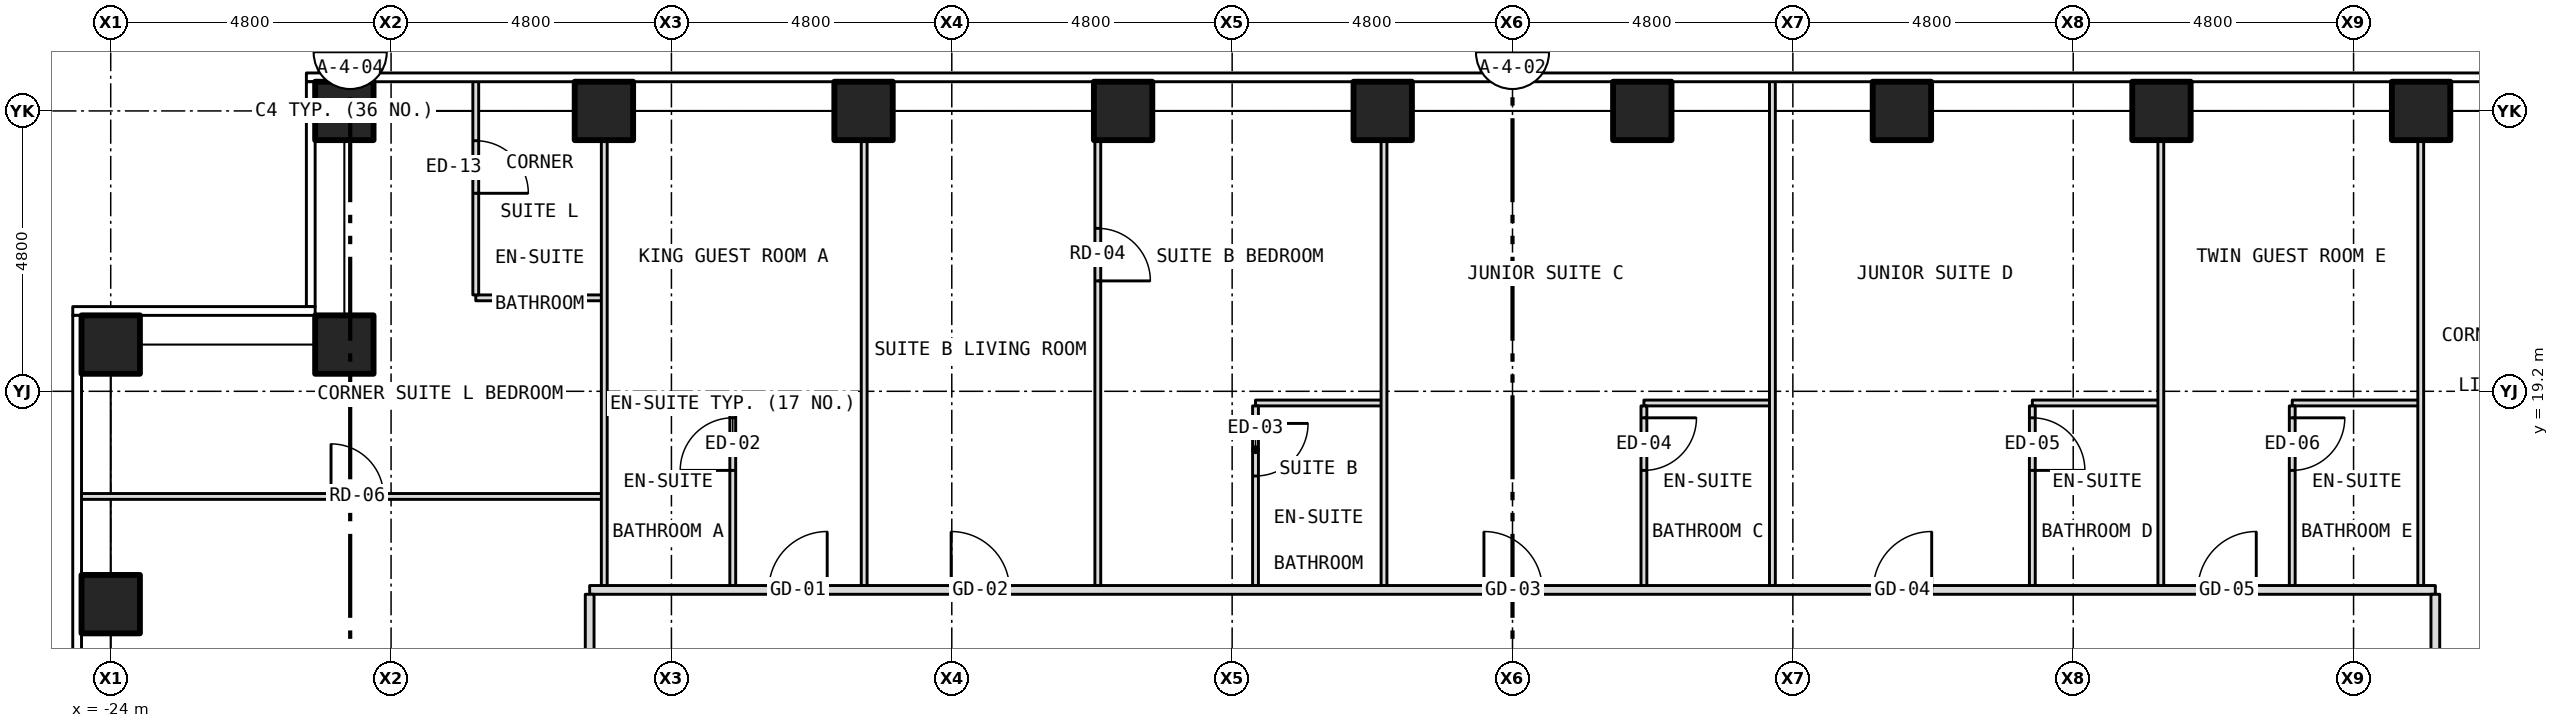
"""IFC4 building model, lengths in metres.
Left out: names, types, materials, properties, quantities, classifications, styles, units other than length and angle.
Written with IfcOpenShell. Run it as: python <this file> out.ifc"""

import sys

from ifc_helpers import new_model, si_unit, direction, frame, frame_2d, origin, origin_2d, place, context, subcontext, project, spatial, rectangle, hollow_rectangle, extrude, element, fill, save


model = new_model("IFC4")
c1 = context("Model", 3, precision=1e-05, world=origin(), true_north=direction((0.0, 1.0)))
c2 = subcontext(c1, "Body", "Model", "MODEL_VIEW")
j1 = project(units=[si_unit("LENGTHUNIT", "METRE"), si_unit("PLANEANGLEUNIT", "RADIAN")], contexts=[c1])
p1 = place(None, origin())
s1 = spatial("IfcSite", under=j1, at=p1, CompositionType="ELEMENT")
p2 = place(p1, origin())
s2 = spatial("IfcBuilding", under=s1, at=p2, CompositionType="ELEMENT")
p3 = place(p2, frame((0.0, 0.0, 46.0)))
s3 = spatial("IfcBuildingStorey", under=s2, at=p3, CompositionType="ELEMENT", Elevation=46.0)
for number, where, z_axis, x_axis in (
    (1, (-20.0, 24.0, -0.15), (0.0, 0.0, 1.0), (1.0, 0.0, 0.0)),
    (2, (-15.556, 24.0, -0.15), (0.0, 0.0, 1.0), (1.0, 0.0, 0.0)),
    (3, (-11.111, 24.0, -0.15), (0.0, 0.0, 1.0), (1.0, 0.0, 0.0)),
    (4, (-6.667, 24.0, -0.15), (0.0, 0.0, 1.0), (1.0, 0.0, 0.0)),
    (5, (-2.222, 24.0, -0.15), (0.0, 0.0, 1.0), (1.0, 0.0, 0.0)),
    (6, (2.222, 24.0, -0.15), (0.0, 0.0, 1.0), (1.0, 0.0, 0.0)),
    (7, (6.667, 24.0, -0.15), (0.0, 0.0, 1.0), (1.0, 0.0, 0.0)),
    (8, (11.111, 24.0, -0.15), (0.0, 0.0, 1.0), (1.0, 0.0, 0.0)),
    (9, (15.556, 24.0, -0.15), (0.0, 0.0, 1.0), (1.0, 0.0, 0.0)),
    (10, (-24.0, 15.556, -0.15), (0.0, 0.0, 1.0), (1.0, 0.0, 0.0)),
    (11, (-24.0, 20.0, -0.15), (0.0, 0.0, 1.0), (1.0, 0.0, 0.0)),
    (12, (-20.0, 20.0, -0.15), (0.0, 0.0, 1.0), (1.0, 0.0, 0.0)),
):
    element("IfcColumn", number, at=place(p3, frame(where, z_axis=z_axis, x_axis=x_axis)), inside=s3, PredefinedType="COLUMN", context=c2, shape_type="SweptSolid", body=[
        extrude(hollow_rectangle(XDim=1.0, YDim=1.0, WallThickness=0.06, at=origin_2d()), origin(), (0.0, 0.0, 1.0), 3.5),
    ])
p4 = place(p3, frame((-15.8, 15.8, 0.0), z_axis=(0.0, 0.0, 1.0), x_axis=(1.0, 0.0, 0.0)))
e13 = element("IfcWall", 13, at=p4, inside=s3, PredefinedType="PARTITIONING", context=c2, shape_type="SweptSolid", body=[
    extrude(rectangle(XDim=31.6, YDim=0.15, at=frame_2d((15.8, 0.0))), origin(), (0.0, 0.0, 1.0), 3.35),
])
p5 = place(p4, frame((3.067, 0.0, 0.0)))
e14 = element("IfcOpeningElement", 14, at=p5, cuts=e13, PredefinedType="OPENING", context=c2, shape_type="SweptSolid", body=[
    extrude(rectangle(XDim=1.0, YDim=2.1, at=frame_2d((0.5, 1.05))), frame((0.0, 0.087, 0.0), z_axis=(0.0, -1.0, 0.0), x_axis=(1.0, 0.0, 0.0)), (0.0, 0.0, 1.0), 0.174),
])
p6 = place(p4, frame((6.189, 0.0, 0.0)))
e15 = element("IfcOpeningElement", 15, at=p6, cuts=e13, PredefinedType="OPENING", context=c2, shape_type="SweptSolid", body=[
    extrude(rectangle(XDim=1.0, YDim=2.1, at=frame_2d((0.5, 1.05))), frame((0.0, 0.087, 0.0), z_axis=(0.0, -1.0, 0.0), x_axis=(1.0, 0.0, 0.0)), (0.0, 0.0, 1.0), 0.174),
])
p7 = place(p4, frame((15.311, 0.0, 0.0)))
e16 = element("IfcOpeningElement", 16, at=p7, cuts=e13, PredefinedType="OPENING", context=c2, shape_type="SweptSolid", body=[
    extrude(rectangle(XDim=1.0, YDim=2.1, at=frame_2d((0.5, 1.05))), frame((0.0, 0.087, 0.0), z_axis=(0.0, -1.0, 0.0), x_axis=(1.0, 0.0, 0.0)), (0.0, 0.0, 1.0), 0.174),
])
p8 = place(p4, frame((21.977, 0.0, 0.0)))
e17 = element("IfcOpeningElement", 17, at=p8, cuts=e13, PredefinedType="OPENING", context=c2, shape_type="SweptSolid", body=[
    extrude(rectangle(XDim=1.0, YDim=2.1, at=frame_2d((0.5, 1.05))), frame((0.0, 0.087, 0.0), z_axis=(0.0, -1.0, 0.0), x_axis=(1.0, 0.0, 0.0)), (0.0, 0.0, 1.0), 0.174),
])
p9 = place(p4, frame((27.534, 0.0, 0.0)))
e18 = element("IfcOpeningElement", 18, at=p9, cuts=e13, PredefinedType="OPENING", context=c2, shape_type="SweptSolid", body=[
    extrude(rectangle(XDim=1.0, YDim=2.1, at=frame_2d((0.5, 1.05))), frame((0.0, 0.087, 0.0), z_axis=(0.0, -1.0, 0.0), x_axis=(1.0, 0.0, 0.0)), (0.0, 0.0, 1.0), 0.174),
])
p10 = place(p3, frame((-24.53, 17.4, 0.0), z_axis=(0.0, 0.0, 1.0), x_axis=(1.0, 0.0, 0.0)))
e19 = element("IfcWall", 19, at=p10, inside=s3, PredefinedType="PARTITIONING", context=c2, shape_type="SweptSolid", body=[
    extrude(rectangle(XDim=8.98, YDim=0.1, at=frame_2d((4.49, 0.0))), origin(), (0.0, 0.0, 1.0), 3.35),
])
p11 = place(p10, frame((4.302, 0.0, 0.0)))
e20 = element("IfcOpeningElement", 20, at=p11, cuts=e19, PredefinedType="OPENING", context=c2, shape_type="SweptSolid", body=[
    extrude(rectangle(XDim=0.9, YDim=2.1, at=frame_2d((0.45, 1.05))), frame((0.0, 0.062, 0.0), z_axis=(0.0, -1.0, 0.0), x_axis=(1.0, 0.0, 0.0)), (0.0, 0.0, 1.0), 0.124),
])
for number, where, z_axis, x_axis in (
    (21, (-15.55, 19.0, 0.0), (0.0, 0.0, 1.0), (1.0, 0.0, 0.0)),
    (22, (-4.4, 19.0, 0.0), (0.0, 0.0, 1.0), (1.0, 0.0, 0.0)),
    (23, (2.25, 19.0, 0.0), (0.0, 0.0, 1.0), (1.0, 0.0, 0.0)),
):
    element("IfcWall", number, at=place(p3, frame(where, z_axis=z_axis, x_axis=x_axis)), inside=s3, PredefinedType="PARTITIONING", context=c2, shape_type="SweptSolid", body=[
        extrude(rectangle(XDim=2.2, YDim=0.1, at=frame_2d((1.1, 0.0))), origin(), (0.0, 0.0, 1.0), 3.35),
    ])
p12 = place(p3, frame((8.9, 19.0, 0.0), z_axis=(0.0, 0.0, 1.0), x_axis=(1.0, 0.0, 0.0)))
e24 = element("IfcWall", 24, at=p12, inside=s3, PredefinedType="PARTITIONING", context=c2, shape_type="SweptSolid", body=[
    extrude(rectangle(XDim=2.2, YDim=0.1, at=frame_2d((1.1, 0.0))), origin(), (0.0, 0.0, 1.0), 3.35),
])
for number, where, z_axis, x_axis in (
    (25, (13.35, 19.0, 0.0), (0.0, 0.0, 1.0), (1.0, 0.0, 0.0)),
    (26, (-17.75, 20.8, 0.0), (0.0, 0.0, 1.0), (1.0, 0.0, 0.0)),
):
    element("IfcWall", number, at=place(p3, frame(where, z_axis=z_axis, x_axis=x_axis)), inside=s3, PredefinedType="PARTITIONING", context=c2, shape_type="SweptSolid", body=[
        extrude(rectangle(XDim=2.2, YDim=0.1, at=frame_2d((1.1, 0.0))), origin(), (0.0, 0.0, 1.0), 3.35),
    ])
p13 = place(p3, frame((-17.75, 20.85, 0.0), z_axis=(0.0, 0.0, 1.0), x_axis=(0.0, 1.0, 0.0)))
e27 = element("IfcWall", 27, at=p13, inside=s3, PredefinedType="PARTITIONING", context=c2, shape_type="SweptSolid", body=[
    extrude(rectangle(XDim=3.68, YDim=0.1, at=frame_2d((1.84, 0.0))), origin(), (0.0, 0.0, 1.0), 3.35),
])
p14 = place(p13, frame((1.74, 0.0, 0.0)))
e28 = element("IfcOpeningElement", 28, at=p14, cuts=e27, PredefinedType="OPENING", context=c2, shape_type="SweptSolid", body=[
    extrude(rectangle(XDim=0.9, YDim=2.1, at=frame_2d((0.45, 1.05))), frame((0.0, 0.062, 0.0), z_axis=(0.0, -1.0, 0.0), x_axis=(1.0, 0.0, 0.0)), (0.0, 0.0, 1.0), 0.124),
])
p15 = place(p3, frame((-15.8, 10.92, 0.0), z_axis=(0.0, 0.0, 1.0), x_axis=(0.0, 1.0, 0.0)))
e29 = element("IfcWall", 29, at=p15, inside=s3, PredefinedType="PARTITIONING", context=c2, shape_type="SweptSolid", body=[
    extrude(rectangle(XDim=4.805, YDim=0.15, at=frame_2d((2.403, 0.0))), origin(), (0.0, 0.0, 1.0), 3.35),
])
p16 = place(p15, frame((0.78, 0.0, 0.0)))
e30 = element("IfcOpeningElement", 30, at=p16, cuts=e29, PredefinedType="OPENING", context=c2, shape_type="SweptSolid", body=[
    extrude(rectangle(XDim=1.0, YDim=2.1, at=frame_2d((0.5, 1.05))), frame((0.0, 0.087, 0.0), z_axis=(0.0, -1.0, 0.0), x_axis=(1.0, 0.0, 0.0)), (0.0, 0.0, 1.0), 0.174),
])
p17 = place(p3, frame((-15.55, 15.875, 0.0), z_axis=(0.0, 0.0, 1.0), x_axis=(0.0, 1.0, 0.0)))
e31 = element("IfcWall", 31, at=p17, inside=s3, PredefinedType="PARTITIONING", context=c2, shape_type="SweptSolid", body=[
    extrude(rectangle(XDim=8.005, YDim=0.1, at=frame_2d((4.002, 0.0))), origin(), (0.0, 0.0, 1.0), 3.35),
])
p18 = place(p3, frame((-13.35, 15.875, 0.0), z_axis=(0.0, 0.0, 1.0), x_axis=(0.0, 1.0, 0.0)))
e32 = element("IfcWall", 32, at=p18, inside=s3, PredefinedType="PARTITIONING", context=c2, shape_type="SweptSolid", body=[
    extrude(rectangle(XDim=3.075, YDim=0.1, at=frame_2d((1.538, 0.0))), origin(), (0.0, 0.0, 1.0), 3.35),
])
p19 = place(p18, frame((1.971, 0.0, 0.0)))
e33 = element("IfcOpeningElement", 33, at=p19, cuts=e32, PredefinedType="OPENING", context=c2, shape_type="SweptSolid", body=[
    extrude(rectangle(XDim=0.9, YDim=2.1, at=frame_2d((0.45, 1.05))), frame((0.0, 0.062, 0.0), z_axis=(0.0, -1.0, 0.0), x_axis=(1.0, 0.0, 0.0)), (0.0, 0.0, 1.0), 0.124),
])
p20 = place(p3, frame((-11.1, 15.875, 0.0), z_axis=(0.0, 0.0, 1.0), x_axis=(0.0, 1.0, 0.0)))
e34 = element("IfcWall", 34, at=p20, inside=s3, PredefinedType="PARTITIONING", context=c2, shape_type="SweptSolid", body=[
    extrude(rectangle(XDim=8.005, YDim=0.1, at=frame_2d((4.002, 0.0))), origin(), (0.0, 0.0, 1.0), 3.35),
])
p21 = place(p3, frame((-7.1, 15.875, 0.0), z_axis=(0.0, 0.0, 1.0), x_axis=(0.0, 1.0, 0.0)))
e35 = element("IfcWall", 35, at=p21, inside=s3, PredefinedType="PARTITIONING", context=c2, shape_type="SweptSolid", body=[
    extrude(rectangle(XDim=8.005, YDim=0.1, at=frame_2d((4.002, 0.0))), origin(), (0.0, 0.0, 1.0), 3.35),
])
p22 = place(p21, frame((5.215, 0.0, 0.0)))
e36 = element("IfcOpeningElement", 36, at=p22, cuts=e35, PredefinedType="OPENING", context=c2, shape_type="SweptSolid", body=[
    extrude(rectangle(XDim=0.9, YDim=2.1, at=frame_2d((0.45, 1.05))), frame((0.0, 0.062, 0.0), z_axis=(0.0, -1.0, 0.0), x_axis=(1.0, 0.0, 0.0)), (0.0, 0.0, 1.0), 0.124),
])
p23 = place(p3, frame((-4.4, 15.875, 0.0), z_axis=(0.0, 0.0, 1.0), x_axis=(0.0, 1.0, 0.0)))
e37 = element("IfcWall", 37, at=p23, inside=s3, PredefinedType="PARTITIONING", context=c2, shape_type="SweptSolid", body=[
    extrude(rectangle(XDim=3.075, YDim=0.1, at=frame_2d((1.538, 0.0))), origin(), (0.0, 0.0, 1.0), 3.35),
])
p24 = place(p23, frame((1.875, 0.0, 0.0)))
e38 = element("IfcOpeningElement", 38, at=p24, cuts=e37, PredefinedType="OPENING", context=c2, shape_type="SweptSolid", body=[
    extrude(rectangle(XDim=0.9, YDim=2.1, at=frame_2d((0.45, 1.05))), frame((0.0, 0.062, 0.0), z_axis=(0.0, -1.0, 0.0), x_axis=(1.0, 0.0, 0.0)), (0.0, 0.0, 1.0), 0.124),
])
p25 = place(p3, frame((-2.2, 15.875, 0.0), z_axis=(0.0, 0.0, 1.0), x_axis=(0.0, 1.0, 0.0)))
e39 = element("IfcWall", 39, at=p25, inside=s3, PredefinedType="PARTITIONING", context=c2, shape_type="SweptSolid", body=[
    extrude(rectangle(XDim=8.005, YDim=0.1, at=frame_2d((4.002, 0.0))), origin(), (0.0, 0.0, 1.0), 3.35),
])
p26 = place(p3, frame((2.25, 15.875, 0.0), z_axis=(0.0, 0.0, 1.0), x_axis=(0.0, 1.0, 0.0)))
e40 = element("IfcWall", 40, at=p26, inside=s3, PredefinedType="PARTITIONING", context=c2, shape_type="SweptSolid", body=[
    extrude(rectangle(XDim=3.075, YDim=0.1, at=frame_2d((1.538, 0.0))), origin(), (0.0, 0.0, 1.0), 3.35),
])
p27 = place(p26, frame((1.971, 0.0, 0.0)))
e41 = element("IfcOpeningElement", 41, at=p27, cuts=e40, PredefinedType="OPENING", context=c2, shape_type="SweptSolid", body=[
    extrude(rectangle(XDim=0.9, YDim=2.1, at=frame_2d((0.45, 1.05))), frame((0.0, 0.062, 0.0), z_axis=(0.0, -1.0, 0.0), x_axis=(1.0, 0.0, 0.0)), (0.0, 0.0, 1.0), 0.124),
])
p28 = place(p3, frame((4.45, 15.875, 0.0), z_axis=(0.0, 0.0, 1.0), x_axis=(0.0, 1.0, 0.0)))
e42 = element("IfcWall", 42, at=p28, inside=s3, PredefinedType="PARTITIONING", context=c2, shape_type="SweptSolid", body=[
    extrude(rectangle(XDim=8.655, YDim=0.1, at=frame_2d((4.328, 0.0))), origin(), (0.0, 0.0, 1.0), 3.35),
])
p29 = place(p3, frame((8.9, 15.875, 0.0), z_axis=(0.0, 0.0, 1.0), x_axis=(0.0, 1.0, 0.0)))
e43 = element("IfcWall", 43, at=p29, inside=s3, PredefinedType="PARTITIONING", context=c2, shape_type="SweptSolid", body=[
    extrude(rectangle(XDim=3.075, YDim=0.1, at=frame_2d((1.538, 0.0))), origin(), (0.0, 0.0, 1.0), 3.35),
])
p30 = place(p29, frame((1.971, 0.0, 0.0)))
e44 = element("IfcOpeningElement", 44, at=p30, cuts=e43, PredefinedType="OPENING", context=c2, shape_type="SweptSolid", body=[
    extrude(rectangle(XDim=0.9, YDim=2.1, at=frame_2d((0.45, 1.05))), frame((0.0, 0.062, 0.0), z_axis=(0.0, -1.0, 0.0), x_axis=(1.0, 0.0, 0.0)), (0.0, 0.0, 1.0), 0.124),
])
p31 = place(p3, frame((11.1, 15.875, 0.0), z_axis=(0.0, 0.0, 1.0), x_axis=(0.0, 1.0, 0.0)))
e45 = element("IfcWall", 45, at=p31, inside=s3, PredefinedType="PARTITIONING", context=c2, shape_type="SweptSolid", body=[
    extrude(rectangle(XDim=8.005, YDim=0.1, at=frame_2d((4.002, 0.0))), origin(), (0.0, 0.0, 1.0), 3.35),
])
p32 = place(p3, frame((13.35, 15.875, 0.0), z_axis=(0.0, 0.0, 1.0), x_axis=(0.0, 1.0, 0.0)))
e46 = element("IfcWall", 46, at=p32, inside=s3, PredefinedType="PARTITIONING", context=c2, shape_type="SweptSolid", body=[
    extrude(rectangle(XDim=3.075, YDim=0.1, at=frame_2d((1.538, 0.0))), origin(), (0.0, 0.0, 1.0), 3.35),
])
p33 = place(p32, frame((1.971, 0.0, 0.0)))
e47 = element("IfcOpeningElement", 47, at=p33, cuts=e46, PredefinedType="OPENING", context=c2, shape_type="SweptSolid", body=[
    extrude(rectangle(XDim=0.9, YDim=2.1, at=frame_2d((0.45, 1.05))), frame((0.0, 0.062, 0.0), z_axis=(0.0, -1.0, 0.0), x_axis=(1.0, 0.0, 0.0)), (0.0, 0.0, 1.0), 0.124),
])
p34 = place(p3, frame((15.55, 15.875, 0.0), z_axis=(0.0, 0.0, 1.0), x_axis=(0.0, 1.0, 0.0)))
e48 = element("IfcWall", 48, at=p34, inside=s3, PredefinedType="PARTITIONING", context=c2, shape_type="SweptSolid", body=[
    extrude(rectangle(XDim=8.005, YDim=0.1, at=frame_2d((4.002, 0.0))), origin(), (0.0, 0.0, 1.0), 3.35),
])
p35 = place(p3, frame((15.8, 10.92, 0.0), z_axis=(0.0, 0.0, 1.0), x_axis=(0.0, 1.0, 0.0)))
e49 = element("IfcWall", 49, at=p35, inside=s3, PredefinedType="PARTITIONING", context=c2, shape_type="SweptSolid", body=[
    extrude(rectangle(XDim=4.805, YDim=0.15, at=frame_2d((2.403, 0.0))), origin(), (0.0, 0.0, 1.0), 3.35),
])
p36 = place(p35, frame((0.78, 0.0, 0.0)))
e50 = element("IfcOpeningElement", 50, at=p36, cuts=e49, PredefinedType="OPENING", context=c2, shape_type="SweptSolid", body=[
    extrude(rectangle(XDim=1.0, YDim=2.1, at=frame_2d((0.5, 1.05))), frame((0.0, 0.087, 0.0), z_axis=(0.0, -1.0, 0.0), x_axis=(1.0, 0.0, 0.0)), (0.0, 0.0, 1.0), 0.174),
])
p37 = place(p5, origin())
e51 = element("IfcDoor", 51, at=p37, inside=s3, OperationType="SINGLE_SWING_RIGHT", PredefinedType="DOOR", context=c2, shape_type="SweptSolid", body=[
    extrude(rectangle(XDim=1.0, YDim=2.1, at=frame_2d((0.5, 1.05))), frame((0.0, 0.025, 0.0), z_axis=(0.0, -1.0, 0.0), x_axis=(1.0, 0.0, 0.0)), (0.0, 0.0, 1.0), 0.05),
])
fill(e14, e51)
p38 = place(p19, origin())
e52 = element("IfcDoor", 52, at=p38, inside=s3, OperationType="SINGLE_SWING_LEFT", PredefinedType="DOOR", context=c2, shape_type="SweptSolid", body=[
    extrude(rectangle(XDim=0.9, YDim=2.1, at=frame_2d((0.45, 1.05))), frame((0.0, 0.025, 0.0), z_axis=(0.0, -1.0, 0.0), x_axis=(1.0, 0.0, 0.0)), (0.0, 0.0, 1.0), 0.05),
])
fill(e33, e52)
p39 = place(p6, origin())
e53 = element("IfcDoor", 53, at=p39, inside=s3, OperationType="SINGLE_SWING_LEFT", PredefinedType="DOOR", context=c2, shape_type="SweptSolid", body=[
    extrude(rectangle(XDim=1.0, YDim=2.1, at=frame_2d((0.5, 1.05))), frame((0.0, 0.025, 0.0), z_axis=(0.0, -1.0, 0.0), x_axis=(1.0, 0.0, 0.0)), (0.0, 0.0, 1.0), 0.05),
])
fill(e15, e53)
p40 = place(p22, origin())
e54 = element("IfcDoor", 54, at=p40, inside=s3, OperationType="SINGLE_SWING_LEFT", PredefinedType="DOOR", context=c2, shape_type="SweptSolid", body=[
    extrude(rectangle(XDim=0.9, YDim=2.1, at=frame_2d((0.45, 1.05))), frame((0.0, 0.025, 0.0), z_axis=(0.0, -1.0, 0.0), x_axis=(1.0, 0.0, 0.0)), (0.0, 0.0, 1.0), 0.05),
])
fill(e36, e54)
p41 = place(p24, origin())
e55 = element("IfcDoor", 55, at=p41, inside=s3, OperationType="SINGLE_SWING_RIGHT", PredefinedType="DOOR", context=c2, shape_type="SweptSolid", body=[
    extrude(rectangle(XDim=0.9, YDim=2.1, at=frame_2d((0.45, 1.05))), frame((0.0, 0.025, 0.0), z_axis=(0.0, -1.0, 0.0), x_axis=(1.0, 0.0, 0.0)), (0.0, 0.0, 1.0), 0.05),
])
fill(e38, e55)
p42 = place(p7, origin())
e56 = element("IfcDoor", 56, at=p42, inside=s3, OperationType="SINGLE_SWING_LEFT", PredefinedType="DOOR", context=c2, shape_type="SweptSolid", body=[
    extrude(rectangle(XDim=1.0, YDim=2.1, at=frame_2d((0.5, 1.05))), frame((0.0, 0.025, 0.0), z_axis=(0.0, -1.0, 0.0), x_axis=(1.0, 0.0, 0.0)), (0.0, 0.0, 1.0), 0.05),
])
fill(e16, e56)
p43 = place(p27, origin())
e57 = element("IfcDoor", 57, at=p43, inside=s3, OperationType="SINGLE_SWING_RIGHT", PredefinedType="DOOR", context=c2, shape_type="SweptSolid", body=[
    extrude(rectangle(XDim=0.9, YDim=2.1, at=frame_2d((0.45, 1.05))), frame((0.0, 0.025, 0.0), z_axis=(0.0, -1.0, 0.0), x_axis=(1.0, 0.0, 0.0)), (0.0, 0.0, 1.0), 0.05),
])
fill(e41, e57)
p44 = place(p8, origin())
e58 = element("IfcDoor", 58, at=p44, inside=s3, OperationType="SINGLE_SWING_RIGHT", PredefinedType="DOOR", context=c2, shape_type="SweptSolid", body=[
    extrude(rectangle(XDim=1.0, YDim=2.1, at=frame_2d((0.5, 1.05))), frame((0.0, 0.025, 0.0), z_axis=(0.0, -1.0, 0.0), x_axis=(1.0, 0.0, 0.0)), (0.0, 0.0, 1.0), 0.05),
])
fill(e17, e58)
p45 = place(p30, origin())
e59 = element("IfcDoor", 59, at=p45, inside=s3, OperationType="SINGLE_SWING_LEFT", PredefinedType="DOOR", context=c2, shape_type="SweptSolid", body=[
    extrude(rectangle(XDim=0.9, YDim=2.1, at=frame_2d((0.45, 1.05))), frame((0.0, 0.025, 0.0), z_axis=(0.0, -1.0, 0.0), x_axis=(1.0, 0.0, 0.0)), (0.0, 0.0, 1.0), 0.05),
])
fill(e44, e59)
p46 = place(p9, origin())
e60 = element("IfcDoor", 60, at=p46, inside=s3, OperationType="SINGLE_SWING_RIGHT", PredefinedType="DOOR", context=c2, shape_type="SweptSolid", body=[
    extrude(rectangle(XDim=1.0, YDim=2.1, at=frame_2d((0.5, 1.05))), frame((0.0, 0.025, 0.0), z_axis=(0.0, -1.0, 0.0), x_axis=(1.0, 0.0, 0.0)), (0.0, 0.0, 1.0), 0.05),
])
fill(e18, e60)
p47 = place(p33, origin())
e61 = element("IfcDoor", 61, at=p47, inside=s3, OperationType="SINGLE_SWING_RIGHT", PredefinedType="DOOR", context=c2, shape_type="SweptSolid", body=[
    extrude(rectangle(XDim=0.9, YDim=2.1, at=frame_2d((0.45, 1.05))), frame((0.0, 0.025, 0.0), z_axis=(0.0, -1.0, 0.0), x_axis=(1.0, 0.0, 0.0)), (0.0, 0.0, 1.0), 0.05),
])
fill(e47, e61)
p48 = place(p11, origin())
e62 = element("IfcDoor", 62, at=p48, inside=s3, OperationType="SINGLE_SWING_LEFT", PredefinedType="DOOR", context=c2, shape_type="SweptSolid", body=[
    extrude(rectangle(XDim=0.9, YDim=2.1, at=frame_2d((0.45, 1.05))), frame((0.0, 0.025, 0.0), z_axis=(0.0, -1.0, 0.0), x_axis=(1.0, 0.0, 0.0)), (0.0, 0.0, 1.0), 0.05),
])
fill(e20, e62)
p49 = place(p14, origin())
e63 = element("IfcDoor", 63, at=p49, inside=s3, OperationType="SINGLE_SWING_LEFT", PredefinedType="DOOR", context=c2, shape_type="SweptSolid", body=[
    extrude(rectangle(XDim=0.9, YDim=2.1, at=frame_2d((0.45, 1.05))), frame((0.0, 0.025, 0.0), z_axis=(0.0, -1.0, 0.0), x_axis=(1.0, 0.0, 0.0)), (0.0, 0.0, 1.0), 0.05),
])
fill(e28, e63)
save(model, sys.argv[1])
